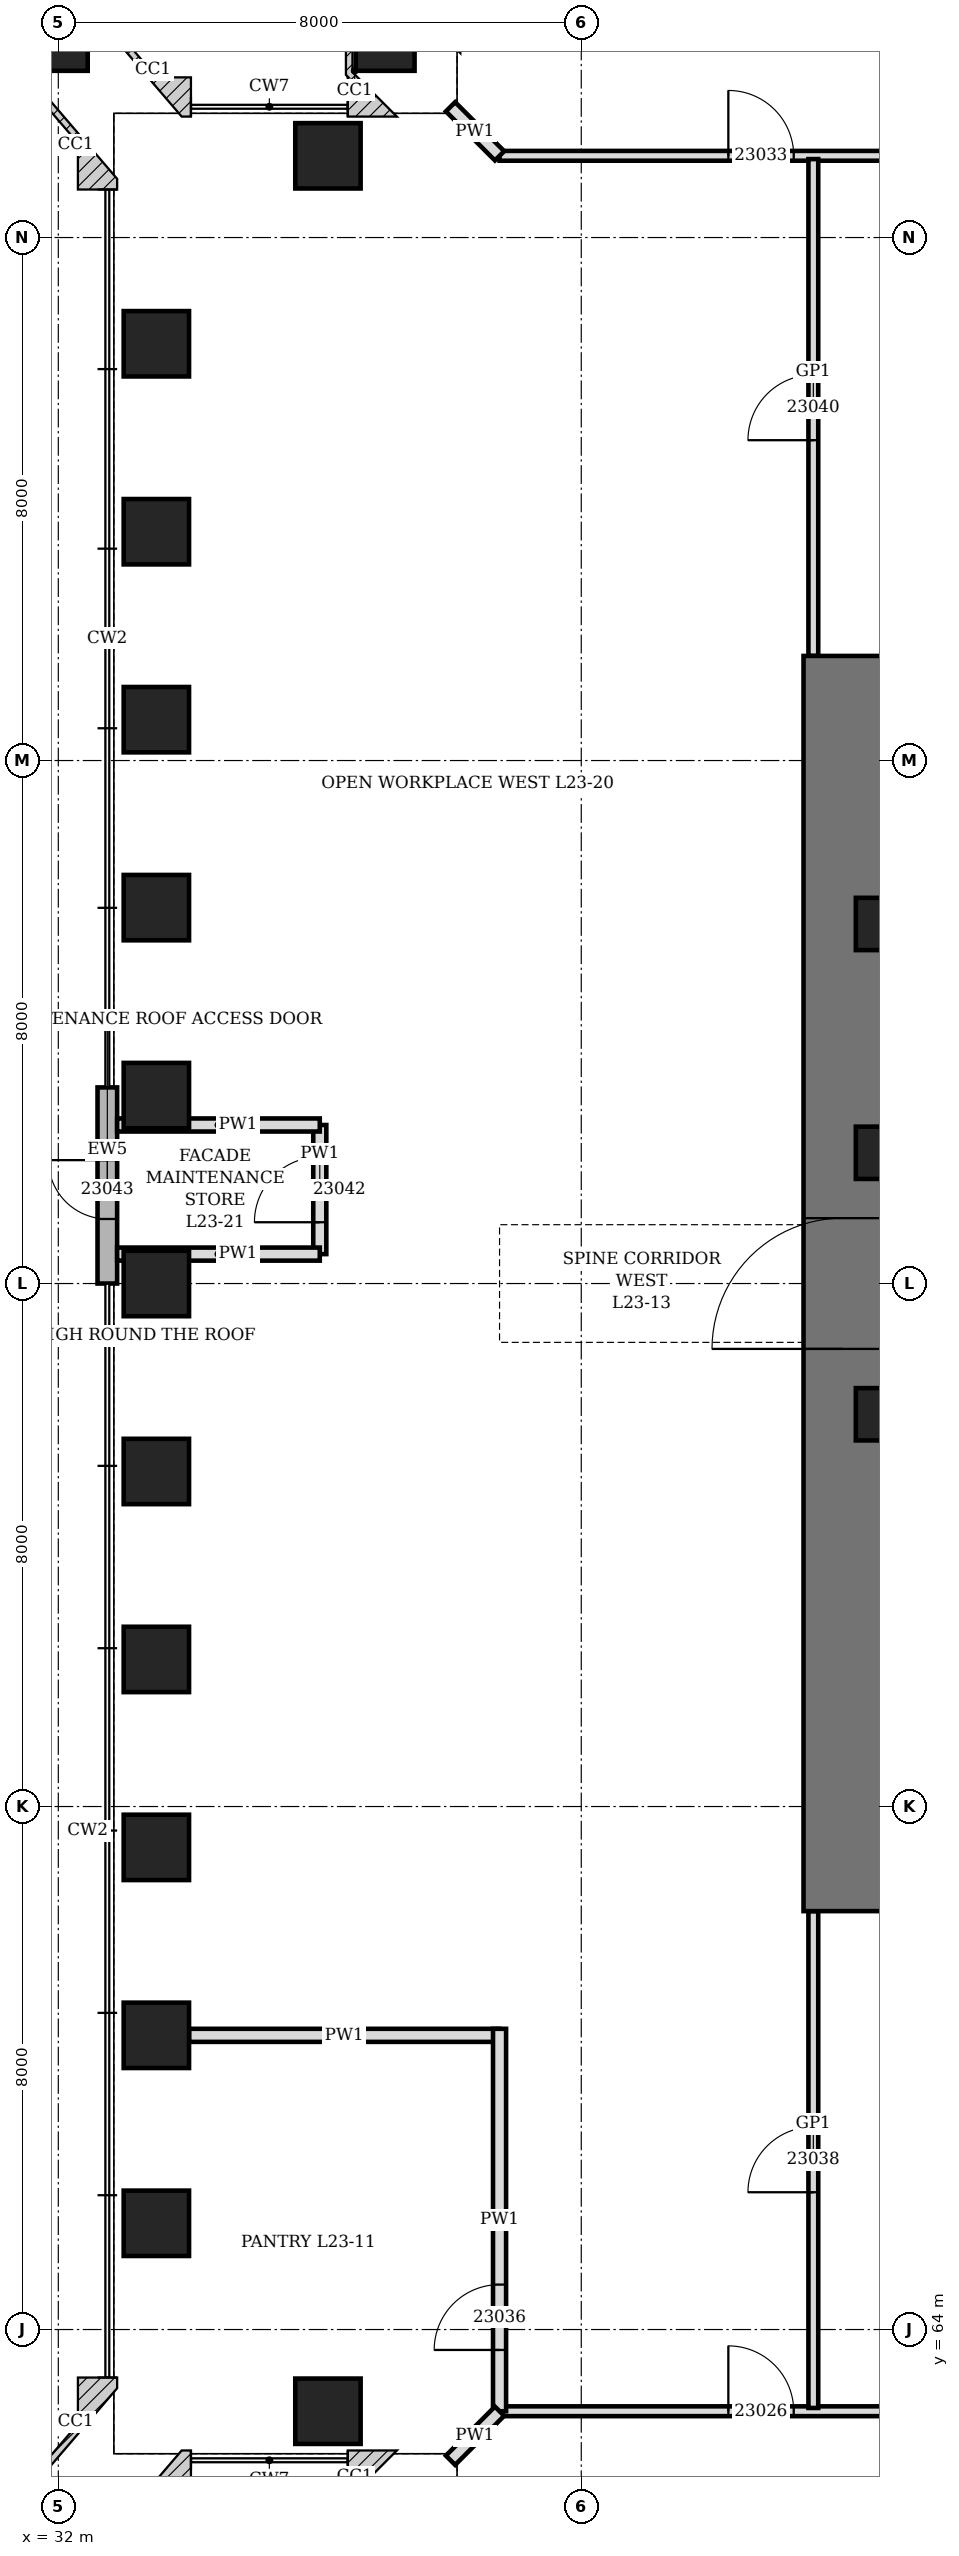
"""IFC4 building model, lengths in metres.
Left out: names, types, materials, properties, quantities, classifications, styles, units other than length and angle.
Written with IfcOpenShell. Run it as: python <this file> out.ifc"""

import sys

from ifc_helpers import new_model, si_unit, direction, frame, frame_2d, origin, origin_2d, place, context, subcontext, project, spatial, rectangle, hollow_rectangle, extrude, clip, halfspace, element, fill, save


model = new_model("IFC4")
c1 = context("Model", 3, precision=1e-05, world=origin(), true_north=direction((0.0, 1.0)))
c2 = subcontext(c1, "Body", "Model", "MODEL_VIEW")
j1 = project(units=[si_unit("LENGTHUNIT", "METRE"), si_unit("PLANEANGLEUNIT", "RADIAN")], contexts=[c1])
p1 = place(None, origin())
s1 = spatial("IfcSite", under=j1, at=p1, CompositionType="ELEMENT")
p2 = place(p1, origin())
s2 = spatial("IfcBuilding", under=s1, at=p2, CompositionType="ELEMENT")
p3 = place(p2, frame((0.0, 0.0, 108.1)))
s3 = spatial("IfcBuildingStorey", under=s2, at=p3, CompositionType="ELEMENT", Elevation=108.1)
p4 = place(p3, frame((37.0, 99.0, -0.25), z_axis=(0.343685624304, -0.343685624304, 0.873933855216), x_axis=(0.707106781187, 0.707106781187, 0.0)))
e1 = element("IfcColumn", 1, at=p4, inside=s3, PredefinedType="COLUMN", context=c2, shape_type="Clipping", body=[
    clip(clip(extrude(hollow_rectangle(XDim=0.9, YDim=0.9, WallThickness=0.2, at=origin_2d()), origin(), (0.0, 0.0, 1.0), 5.092), halfspace(frame((0.0, 0.0, 0.253), z_axis=(0.0, 0.0, 1.0), x_axis=(1.0, 0.0, 0.0)), True)), halfspace(frame((0.0, 0.0, 4.839), z_axis=(0.0, 0.0, -1.0), x_axis=(1.0, 0.0, 0.0)), True)),
])
p5 = place(p3, frame((36.125, 97.25, -0.25), z_axis=(0.0, 0.0, 1.0), x_axis=(1.0, 0.0, 0.0)))
e2 = element("IfcColumn", 2, at=p5, inside=s3, PredefinedType="COLUMN", context=c2, shape_type="SweptSolid", body=[
    extrude(hollow_rectangle(XDim=1.0, YDim=1.0, WallThickness=0.35, at=origin_2d()), origin(), (0.0, 0.0, 1.0), 4.45),
])
p6 = place(p3, frame((32.0, 99.0, -0.25), z_axis=(0.299314960964, -0.349200787792, 0.887957974202), x_axis=(0.759256602365, 0.650791373456, 0.0)))
e3 = element("IfcColumn", 3, at=p6, inside=s3, PredefinedType="COLUMN", context=c2, shape_type="Clipping", body=[
    clip(clip(extrude(hollow_rectangle(XDim=0.9, YDim=0.9, WallThickness=0.2, at=origin_2d()), origin(), (0.0, 0.0, 1.0), 5.011), halfspace(frame((0.0, 0.0, 0.235), z_axis=(0.0, 0.0, 1.0), x_axis=(1.0, 0.0, 0.0)), True)), halfspace(frame((0.0, 0.0, 4.776), z_axis=(0.0, 0.0, -1.0), x_axis=(1.0, 0.0, 0.0)), True)),
])
for number, where, z_axis, x_axis in (
    (4, (33.5, 94.375, -0.25), (0.0, 0.0, 1.0), (0.0, 1.0, 0.0)),
    (5, (33.5, 91.5, -0.25), (0.0, 0.0, 1.0), (0.0, 1.0, 0.0)),
    (6, (33.5, 88.625, -0.25), (0.0, 0.0, 1.0), (0.0, 1.0, 0.0)),
    (7, (33.5, 85.75, -0.25), (0.0, 0.0, 1.0), (0.0, 1.0, 0.0)),
    (8, (33.5, 82.875, -0.25), (0.0, 0.0, 1.0), (0.0, 1.0, 0.0)),
    (9, (33.5, 80.0, -0.25), (0.0, 0.0, 1.0), (0.0, 1.0, 0.0)),
    (10, (33.5, 77.125, -0.25), (0.0, 0.0, 1.0), (0.0, 1.0, 0.0)),
    (11, (33.5, 74.25, -0.25), (0.0, 0.0, 1.0), (0.0, 1.0, 0.0)),
    (12, (33.5, 71.375, -0.25), (0.0, 0.0, 1.0), (0.0, 1.0, 0.0)),
    (13, (33.5, 68.5, -0.25), (0.0, 0.0, 1.0), (0.0, 1.0, 0.0)),
    (14, (33.5, 65.625, -0.25), (0.0, 0.0, 1.0), (0.0, 1.0, 0.0)),
):
    element("IfcColumn", number, at=place(p3, frame(where, z_axis=z_axis, x_axis=x_axis)), inside=s3, PredefinedType="COLUMN", context=c2, shape_type="SweptSolid", body=[
        extrude(hollow_rectangle(XDim=1.0, YDim=1.0, WallThickness=0.35, at=origin_2d()), origin(), (0.0, 0.0, 1.0), 4.45),
    ])
p7 = place(p3, frame((32.0, 61.0, -0.25), z_axis=(0.299314960964, 0.349200787792, 0.887957974202), x_axis=(-0.759256602365, 0.650791373456, 0.0)))
e15 = element("IfcColumn", 15, at=p7, inside=s3, PredefinedType="COLUMN", context=c2, shape_type="Clipping", body=[
    clip(clip(extrude(hollow_rectangle(XDim=0.9, YDim=0.9, WallThickness=0.2, at=origin_2d()), origin(), (0.0, 0.0, 1.0), 5.011), halfspace(frame((0.0, 0.0, 0.235), z_axis=(0.0, 0.0, 1.0), x_axis=(1.0, 0.0, 0.0)), True)), halfspace(frame((0.0, 0.0, 4.776), z_axis=(0.0, 0.0, -1.0), x_axis=(1.0, 0.0, 0.0)), True)),
])
p8 = place(p3, frame((36.125, 62.75, -0.25), z_axis=(0.0, 0.0, 1.0), x_axis=(1.0, 0.0, 0.0)))
e16 = element("IfcColumn", 16, at=p8, inside=s3, PredefinedType="COLUMN", context=c2, shape_type="SweptSolid", body=[
    extrude(hollow_rectangle(XDim=1.0, YDim=1.0, WallThickness=0.35, at=origin_2d()), origin(), (0.0, 0.0, 1.0), 4.45),
])
p9 = place(p3, frame((37.0, 61.0, -0.25), z_axis=(0.343685624304, 0.343685624304, 0.873933855216), x_axis=(-0.707106781187, 0.707106781187, 0.0)))
e17 = element("IfcColumn", 17, at=p9, inside=s3, PredefinedType="COLUMN", context=c2, shape_type="Clipping", body=[
    clip(clip(extrude(hollow_rectangle(XDim=0.9, YDim=0.9, WallThickness=0.2, at=origin_2d()), origin(), (0.0, 0.0, 1.0), 5.092), halfspace(frame((0.0, 0.0, 0.253), z_axis=(0.0, 0.0, 1.0), x_axis=(1.0, 0.0, 0.0)), True)), halfspace(frame((0.0, 0.0, 4.839), z_axis=(0.0, 0.0, -1.0), x_axis=(1.0, 0.0, 0.0)), True)),
])
p10 = place(p3, frame((44.0, 70.4, 0.0), z_axis=(0.0, 0.0, 1.0), x_axis=(0.0, 1.0, 0.0)))
e18 = element("IfcWall", 18, at=p10, inside=s3, PredefinedType="SHEAR", context=c2, shape_type="SweptSolid", body=[
    extrude(rectangle(XDim=19.2, YDim=1.2, at=frame_2d((9.6, 0.0))), origin(), (0.0, 0.0, 1.0), 4.2),
])
p11 = place(p10, frame((8.6, 0.0, 0.0)))
e19 = element("IfcOpeningElement", 19, at=p11, cuts=e18, PredefinedType="OPENING", context=c2, shape_type="SweptSolid", body=[
    extrude(rectangle(XDim=2.0, YDim=2.4, at=frame_2d((1.0, 1.2))), frame((0.0, 0.61, 0.0), z_axis=(0.0, -1.0, 0.0), x_axis=(1.0, 0.0, 0.0)), (0.0, 0.0, 1.0), 1.22),
])
for number, where, z_axis, x_axis in (
    (20, (44.6, 78.0, 0.0), (0.0, 0.0, 1.0), (1.0, 0.0, 0.0)),
    (21, (44.6, 82.0, 0.0), (0.0, 0.0, 1.0), (1.0, 0.0, 0.0)),
    (22, (44.6, 85.5, 0.0), (0.0, 0.0, 1.0), (1.0, 0.0, 0.0)),
):
    element("IfcColumn", number, at=place(p3, frame(where, z_axis=z_axis, x_axis=x_axis)), inside=s3, PredefinedType="COLUMN", context=c2, shape_type="SweptSolid", body=[
        extrude(hollow_rectangle(XDim=0.8, YDim=0.8, WallThickness=0.1, at=origin_2d()), origin(), (0.0, 0.0, 1.0), 4.2),
    ])
p12 = place(p3, frame((32.75, 83.0, 0.0), z_axis=(0.0, 0.0, 1.0), x_axis=(0.0, -1.0, 0.0)))
e23 = element("IfcWall", 23, at=p12, inside=s3, PredefinedType="SOLIDWALL", context=c2, shape_type="SweptSolid", body=[
    extrude(rectangle(XDim=3.0, YDim=0.3, at=frame_2d((1.5, 0.0))), origin(), (0.0, 0.0, 1.0), 4.04),
])
p13 = place(p12, frame((1.113, 0.0, 0.0)))
e24 = element("IfcOpeningElement", 24, at=p13, cuts=e23, PredefinedType="OPENING", context=c2, shape_type="SweptSolid", body=[
    extrude(rectangle(XDim=0.9, YDim=2.1, at=frame_2d((0.45, 1.05))), frame((0.0, 0.16, 0.0), z_axis=(0.0, -1.0, 0.0), x_axis=(1.0, 0.0, 0.0)), (0.0, 0.0, 1.0), 0.32),
])
p14 = place(p3, frame((34.0, 68.5, 0.0), z_axis=(0.0, 0.0, 1.0), x_axis=(1.0, 0.0, 0.0)))
e25 = element("IfcWall", 25, at=p14, inside=s3, PredefinedType="PARTITIONING", context=c2, shape_type="SweptSolid", body=[
    extrude(rectangle(XDim=4.75, YDim=0.2, at=frame_2d((2.375, 0.0))), origin(), (0.0, 0.0, 1.0), 3.428),
])
p15 = place(p3, frame((38.75, 62.75, 0.0), z_axis=(0.0, 0.0, 1.0), x_axis=(1.0, 0.0, 0.0)))
e26 = element("IfcWall", 26, at=p15, inside=s3, PredefinedType="PARTITIONING", context=c2, shape_type="SweptSolid", body=[
    extrude(rectangle(XDim=34.5, YDim=0.15, at=frame_2d((17.25, 0.0))), origin(), (0.0, 0.0, 1.0), 4.04),
])
p16 = place(p15, frame((3.5, 0.0, 0.0)))
e27 = element("IfcOpeningElement", 27, at=p16, cuts=e26, PredefinedType="OPENING", context=c2, shape_type="SweptSolid", body=[
    extrude(rectangle(XDim=1.0, YDim=2.4, at=frame_2d((0.5, 1.2))), frame((0.0, 0.085, 0.0), z_axis=(0.0, -1.0, 0.0), x_axis=(1.0, 0.0, 0.0)), (0.0, 0.0, 1.0), 0.17),
])
p17 = place(p15, frame((15.312, 0.0, 0.0)))
e28 = element("IfcOpeningElement", 28, at=p17, cuts=e26, PredefinedType="OPENING", context=c2, shape_type="SweptSolid", body=[
    extrude(rectangle(XDim=1.0, YDim=2.4, at=frame_2d((0.5, 1.2))), frame((0.0, 0.085, 0.0), z_axis=(0.0, -1.0, 0.0), x_axis=(1.0, 0.0, 0.0)), (0.0, 0.0, 1.0), 0.17),
])
p18 = place(p15, frame((26.812, 0.0, 0.0)))
e29 = element("IfcOpeningElement", 29, at=p18, cuts=e26, PredefinedType="OPENING", context=c2, shape_type="SweptSolid", body=[
    extrude(rectangle(XDim=1.0, YDim=2.4, at=frame_2d((0.5, 1.2))), frame((0.0, 0.085, 0.0), z_axis=(0.0, -1.0, 0.0), x_axis=(1.0, 0.0, 0.0)), (0.0, 0.0, 1.0), 0.17),
])
p19 = place(p3, frame((38.75, 97.25, 0.0), z_axis=(0.0, 0.0, 1.0), x_axis=(1.0, 0.0, 0.0)))
e30 = element("IfcWall", 30, at=p19, inside=s3, PredefinedType="PARTITIONING", context=c2, shape_type="SweptSolid", body=[
    extrude(rectangle(XDim=28.85, YDim=0.15, at=frame_2d((14.425, 0.0))), origin(), (0.0, 0.0, 1.0), 4.04),
])
p20 = place(p19, frame((3.5, 0.0, 0.0)))
e31 = element("IfcOpeningElement", 31, at=p20, cuts=e30, PredefinedType="OPENING", context=c2, shape_type="SweptSolid", body=[
    extrude(rectangle(XDim=1.0, YDim=2.4, at=frame_2d((0.5, 1.2))), frame((0.0, 0.085, 0.0), z_axis=(0.0, -1.0, 0.0), x_axis=(1.0, 0.0, 0.0)), (0.0, 0.0, 1.0), 0.17),
])
p21 = place(p19, frame((15.312, 0.0, 0.0)))
e32 = element("IfcOpeningElement", 32, at=p21, cuts=e30, PredefinedType="OPENING", context=c2, shape_type="SweptSolid", body=[
    extrude(rectangle(XDim=1.0, YDim=2.4, at=frame_2d((0.5, 1.2))), frame((0.0, 0.085, 0.0), z_axis=(0.0, -1.0, 0.0), x_axis=(1.0, 0.0, 0.0)), (0.0, 0.0, 1.0), 0.17),
])
p22 = place(p19, frame((23.938, 0.0, 0.0)))
e33 = element("IfcOpeningElement", 33, at=p22, cuts=e30, PredefinedType="OPENING", context=c2, shape_type="SweptSolid", body=[
    extrude(rectangle(XDim=1.0, YDim=2.4, at=frame_2d((0.5, 1.2))), frame((0.0, 0.085, 0.0), z_axis=(0.0, -1.0, 0.0), x_axis=(1.0, 0.0, 0.0)), (0.0, 0.0, 1.0), 0.17),
])
p23 = place(p3, frame((38.75, 62.75, 0.0), z_axis=(0.0, 0.0, 1.0), x_axis=(0.0, 1.0, 0.0)))
e34 = element("IfcWall", 34, at=p23, inside=s3, PredefinedType="PARTITIONING", context=c2, shape_type="SweptSolid", body=[
    extrude(rectangle(XDim=5.85, YDim=0.2, at=frame_2d((2.925, 0.0))), origin(), (0.0, 0.0, 1.0), 4.04),
])
p24 = place(p23, frame((0.938, 0.0, 0.0)))
e35 = element("IfcOpeningElement", 35, at=p24, cuts=e34, PredefinedType="OPENING", context=c2, shape_type="SweptSolid", body=[
    extrude(rectangle(XDim=1.0, YDim=2.1, at=frame_2d((0.5, 1.05))), frame((0.0, 0.11, 0.0), z_axis=(0.0, -1.0, 0.0), x_axis=(1.0, 0.0, 0.0)), (0.0, 0.0, 1.0), 0.22),
])
p25 = place(p3, frame((43.55, 62.8, 0.0), z_axis=(0.0, 0.0, 1.0), x_axis=(0.0, 1.0, 0.0)))
e36 = element("IfcWall", 36, at=p25, inside=s3, PredefinedType="PARTITIONING", context=c2, shape_type="SweptSolid", body=[
    extrude(rectangle(XDim=7.6, YDim=0.15, at=frame_2d((3.8, 0.0))), origin(), (0.0, 0.0, 1.0), 4.04),
])
p26 = place(p25, frame((3.3, 0.0, 0.0)))
e37 = element("IfcOpeningElement", 37, at=p26, cuts=e36, PredefinedType="OPENING", context=c2, shape_type="SweptSolid", body=[
    extrude(rectangle(XDim=1.0, YDim=2.4, at=frame_2d((0.5, 1.2))), frame((0.0, 0.085, 0.0), z_axis=(0.0, -1.0, 0.0), x_axis=(1.0, 0.0, 0.0)), (0.0, 0.0, 1.0), 0.17),
])
p27 = place(p3, frame((43.55, 89.6, 0.0), z_axis=(0.0, 0.0, 1.0), x_axis=(0.0, 1.0, 0.0)))
e38 = element("IfcWall", 38, at=p27, inside=s3, PredefinedType="PARTITIONING", context=c2, shape_type="SweptSolid", body=[
    extrude(rectangle(XDim=7.6, YDim=0.15, at=frame_2d((3.8, 0.0))), origin(), (0.0, 0.0, 1.0), 4.04),
])
p28 = place(p27, frame((3.3, 0.0, 0.0)))
e39 = element("IfcOpeningElement", 39, at=p28, cuts=e38, PredefinedType="OPENING", context=c2, shape_type="SweptSolid", body=[
    extrude(rectangle(XDim=1.0, YDim=2.4, at=frame_2d((0.5, 1.2))), frame((0.0, 0.085, 0.0), z_axis=(0.0, -1.0, 0.0), x_axis=(1.0, 0.0, 0.0)), (0.0, 0.0, 1.0), 0.17),
])
for number, where, z_axis, x_axis in (
    (40, (38.75, 62.75, 0.0), (0.0, 0.0, 1.0), (-0.707, -0.707, 0.0)),
    (41, (38.75, 97.25, 0.0), (0.0, 0.0, 1.0), (-0.707, 0.707, 0.0)),
):
    element("IfcWall", number, at=place(p3, frame(where, z_axis=z_axis, x_axis=x_axis)), inside=s3, PredefinedType="PARTITIONING", context=c2, shape_type="SweptSolid", body=[
        extrude(rectangle(XDim=1.061, YDim=0.2, at=frame_2d((0.53, 0.0))), origin(), (0.0, 0.0, 1.0), 4.04),
    ])
p29 = place(p3, frame((36.0, 80.45, 0.0), z_axis=(0.0, 0.0, 1.0), x_axis=(0.0, 1.0, 0.0)))
e42 = element("IfcWall", 42, at=p29, inside=s3, PredefinedType="PARTITIONING", context=c2, shape_type="SweptSolid", body=[
    extrude(rectangle(XDim=1.975, YDim=0.2, at=frame_2d((0.988, 0.0))), origin(), (0.0, 0.0, 1.0), 4.04),
])
p30 = place(p29, frame((0.488, 0.0, 0.0)))
e43 = element("IfcOpeningElement", 43, at=p30, cuts=e42, PredefinedType="OPENING", context=c2, shape_type="SweptSolid", body=[
    extrude(rectangle(XDim=1.0, YDim=2.1, at=frame_2d((0.5, 1.05))), frame((0.0, 0.11, 0.0), z_axis=(0.0, -1.0, 0.0), x_axis=(1.0, 0.0, 0.0)), (0.0, 0.0, 1.0), 0.22),
])
for number, where, z_axis, x_axis in (
    (44, (32.9, 80.45, 0.0), (0.0, 0.0, 1.0), (1.0, 0.0, 0.0)),
    (45, (32.9, 82.425, 0.0), (0.0, 0.0, 1.0), (1.0, 0.0, 0.0)),
):
    element("IfcWall", number, at=place(p3, frame(where, z_axis=z_axis, x_axis=x_axis)), inside=s3, PredefinedType="PARTITIONING", context=c2, shape_type="SweptSolid", body=[
        extrude(rectangle(XDim=3.1, YDim=0.2, at=frame_2d((1.55, 0.0))), origin(), (0.0, 0.0, 1.0), 4.04),
    ])
p31 = place(p11, origin())
e46 = element("IfcDoor", 46, at=p31, inside=s3, OperationType="DOUBLE_DOOR_SINGLE_SWING", PredefinedType="DOOR", context=c2, shape_type="SweptSolid", body=[
    extrude(rectangle(XDim=2.0, YDim=2.4, at=frame_2d((1.0, 1.2))), frame((0.0, 0.35, 0.0), z_axis=(0.0, -1.0, 0.0), x_axis=(1.0, 0.0, 0.0)), (0.0, 0.0, 1.0), 0.7),
])
fill(e19, e46)
p32 = place(p16, origin())
e47 = element("IfcDoor", 47, at=p32, inside=s3, OperationType="SINGLE_SWING_RIGHT", PredefinedType="DOOR", context=c2, shape_type="SweptSolid", body=[
    extrude(rectangle(XDim=1.0, YDim=2.4, at=frame_2d((0.5, 1.2))), frame((0.0, 0.075, 0.0), z_axis=(0.0, -1.0, 0.0), x_axis=(1.0, 0.0, 0.0)), (0.0, 0.0, 1.0), 0.149),
])
fill(e27, e47)
p33 = place(p20, origin())
e48 = element("IfcDoor", 48, at=p33, inside=s3, OperationType="SINGLE_SWING_RIGHT", PredefinedType="DOOR", context=c2, shape_type="SweptSolid", body=[
    extrude(rectangle(XDim=1.0, YDim=2.4, at=frame_2d((0.5, 1.2))), frame((0.0, 0.075, 0.0), z_axis=(0.0, -1.0, 0.0), x_axis=(1.0, 0.0, 0.0)), (0.0, 0.0, 1.0), 0.149),
])
fill(e31, e48)
p34 = place(p24, origin())
e49 = element("IfcDoor", 49, at=p34, inside=s3, OperationType="SINGLE_SWING_LEFT", PredefinedType="DOOR", context=c2, shape_type="SweptSolid", body=[
    extrude(rectangle(XDim=1.0, YDim=2.1, at=frame_2d((0.5, 1.05))), frame((0.0, 0.1, 0.0), z_axis=(0.0, -1.0, 0.0), x_axis=(1.0, 0.0, 0.0)), (0.0, 0.0, 1.0), 0.199),
])
fill(e35, e49)
p35 = place(p26, origin())
e50 = element("IfcDoor", 50, at=p35, inside=s3, OperationType="SINGLE_SWING_RIGHT", PredefinedType="DOOR", context=c2, shape_type="SweptSolid", body=[
    extrude(rectangle(XDim=1.0, YDim=2.4, at=frame_2d((0.5, 1.2))), frame((0.0, 0.075, 0.0), z_axis=(0.0, -1.0, 0.0), x_axis=(1.0, 0.0, 0.0)), (0.0, 0.0, 1.0), 0.149),
])
fill(e37, e50)
p36 = place(p28, origin())
e51 = element("IfcDoor", 51, at=p36, inside=s3, OperationType="SINGLE_SWING_RIGHT", PredefinedType="DOOR", context=c2, shape_type="SweptSolid", body=[
    extrude(rectangle(XDim=1.0, YDim=2.4, at=frame_2d((0.5, 1.2))), frame((0.0, 0.075, 0.0), z_axis=(0.0, -1.0, 0.0), x_axis=(1.0, 0.0, 0.0)), (0.0, 0.0, 1.0), 0.149),
])
fill(e39, e51)
p37 = place(p30, origin())
e52 = element("IfcDoor", 52, at=p37, inside=s3, OperationType="SINGLE_SWING_LEFT", PredefinedType="DOOR", context=c2, shape_type="SweptSolid", body=[
    extrude(rectangle(XDim=1.0, YDim=2.1, at=frame_2d((0.5, 1.05))), frame((0.0, 0.1, 0.0), z_axis=(0.0, -1.0, 0.0), x_axis=(1.0, 0.0, 0.0)), (0.0, 0.0, 1.0), 0.199),
])
fill(e43, e52)
p38 = place(p13, frame((0.9, 0.0, 0.0), z_axis=(0.0, 0.0, 1.0), x_axis=(-1.0, 0.0, 0.0)))
e53 = element("IfcDoor", 53, at=p38, inside=s3, OperationType="SINGLE_SWING_RIGHT", PredefinedType="DOOR", context=c2, shape_type="SweptSolid", body=[
    extrude(rectangle(XDim=0.9, YDim=2.1, at=frame_2d((0.45, 1.05))), frame((0.0, 0.15, 0.0), z_axis=(0.0, -1.0, 0.0), x_axis=(1.0, 0.0, 0.0)), (0.0, 0.0, 1.0), 0.3),
])
fill(e24, e53)
save(model, sys.argv[1])
